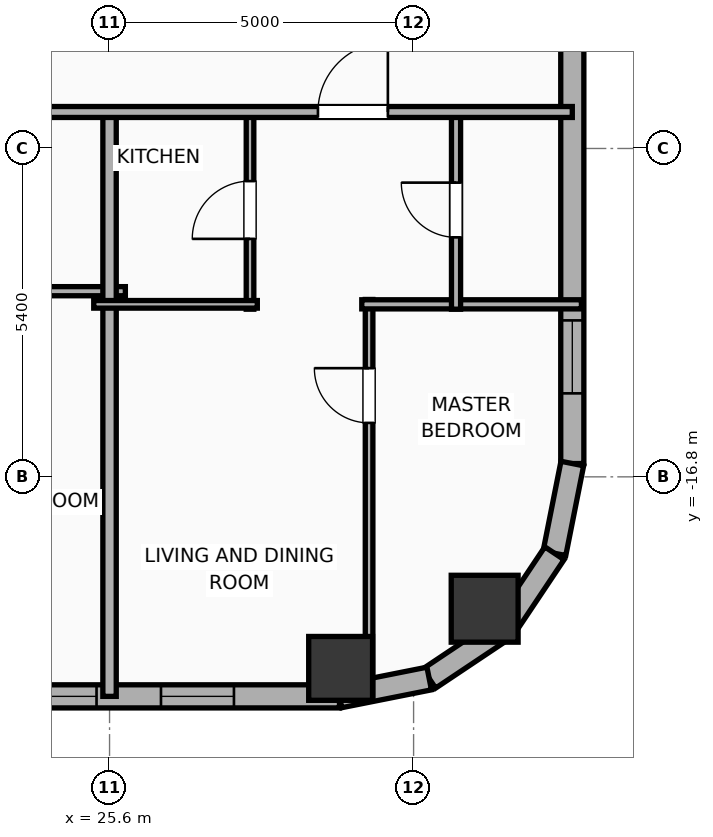
"""IFC4 building model, lengths in metres.
Left out: names, types, materials, properties, quantities, classifications, styles, units other than length and angle.
Written with IfcOpenShell. Run it as: python <this file> out.ifc"""

import sys

from ifc_helpers import new_model, si_unit, direction, frame, frame_2d, origin, origin_2d, place, context, subcontext, project, spatial, rectangle, hollow_rectangle, hollow_circle, extrude, element, fill, save


model = new_model("IFC4")
c1 = context("Model", 3, precision=1e-05, world=origin(), true_north=direction((0.0, 1.0)))
c2 = subcontext(c1, "Body", "Model", "MODEL_VIEW")
j1 = project(units=[si_unit("LENGTHUNIT", "METRE"), si_unit("PLANEANGLEUNIT", "RADIAN")], contexts=[c1])
p1 = place(None, origin())
s1 = spatial("IfcSite", under=j1, at=p1, CompositionType="ELEMENT")
p2 = place(p1, origin())
s2 = spatial("IfcBuilding", under=s1, at=p2, CompositionType="ELEMENT")
p3 = place(p2, frame((0.0, 0.0, 109.2)))
s3 = spatial("IfcBuildingStorey", under=s2, at=p3, CompositionType="ELEMENT", Elevation=109.2)
p4 = place(p3, frame((29.4, -19.95, 0.0), z_axis=(0.0, 0.0, 1.0), x_axis=(1.0, 0.0, 0.0)))
e1 = element("IfcColumn", 1, at=p4, inside=s3, PredefinedType="COLUMN", context=c2, shape_type="SweptSolid", body=[
    extrude(hollow_rectangle(XDim=1.05, YDim=1.05, WallThickness=0.036, at=origin_2d()), origin(), (0.0, 0.0, 1.0), 3.9),
])
p5 = place(p3, frame((31.769, -18.969, 0.0), z_axis=(0.0, 0.0, 1.0), x_axis=(1.0, 0.0, 0.0)))
e2 = element("IfcColumn", 2, at=p5, inside=s3, PredefinedType="COLUMN", context=c2, shape_type="SweptSolid", body=[
    extrude(hollow_circle(Radius=0.55, WallThickness=0.036, at=origin_2d()), origin(), (0.0, 0.0, 1.0), 3.9),
])
p6 = place(p3, frame((29.381, -20.41, 0.0), z_axis=(0.0, 0.0, 1.0), x_axis=(-1.0, 0.0, 0.0)))
e3 = element("IfcWall", 3, at=p6, inside=s3, PredefinedType="ELEMENTEDWALL", context=c2, shape_type="SweptSolid", body=[
    extrude(rectangle(XDim=54.763, YDim=0.38, at=frame_2d((27.381, 0.0))), origin(), (0.0, 0.0, 1.0), 3.65),
])
p7 = place(p6, frame((3.995, 0.0, 0.75)))
e4 = element("IfcOpeningElement", 4, at=p7, cuts=e3, PredefinedType="OPENING", context=c2, shape_type="SweptSolid", body=[
    extrude(rectangle(XDim=2.4, YDim=2.1, at=frame_2d((1.2, 1.05))), frame((0.0, 0.2, 0.0), z_axis=(0.0, -1.0, 0.0), x_axis=(1.0, 0.0, 0.0)), (0.0, 0.0, 1.0), 0.4),
])
p8 = place(p6, frame((18.486, 0.0, 0.75)))
e5 = element("IfcOpeningElement", 5, at=p8, cuts=e3, PredefinedType="OPENING", context=c2, shape_type="SweptSolid", body=[
    extrude(rectangle(XDim=2.4, YDim=2.1, at=frame_2d((1.2, 1.05))), frame((0.0, 0.2, 0.0), z_axis=(0.0, -1.0, 0.0), x_axis=(1.0, 0.0, 0.0)), (0.0, 0.0, 1.0), 0.4),
])
p9 = place(p6, frame((46.717, 0.0, 0.75)))
e6 = element("IfcOpeningElement", 6, at=p9, cuts=e3, PredefinedType="OPENING", context=c2, shape_type="SweptSolid", body=[
    extrude(rectangle(XDim=2.4, YDim=2.1, at=frame_2d((1.2, 1.05))), frame((0.0, 0.2, 0.0), z_axis=(0.0, -1.0, 0.0), x_axis=(1.0, 0.0, 0.0)), (0.0, 0.0, 1.0), 0.4),
])
p10 = place(p6, frame((52.651, 0.0, 0.75)))
e7 = element("IfcOpeningElement", 7, at=p10, cuts=e3, PredefinedType="OPENING", context=c2, shape_type="SweptSolid", body=[
    extrude(rectangle(XDim=1.2, YDim=2.05, at=frame_2d((0.6, 1.025))), frame((0.0, 0.2, 0.0), z_axis=(0.0, -1.0, 0.0), x_axis=(1.0, 0.0, 0.0)), (0.0, 0.0, 1.0), 0.4),
])
p11 = place(p6, frame((50.521, 0.0, 0.75)))
e8 = element("IfcOpeningElement", 8, at=p11, cuts=e3, PredefinedType="OPENING", context=c2, shape_type="SweptSolid", body=[
    extrude(rectangle(XDim=1.2, YDim=2.05, at=frame_2d((0.6, 1.025))), frame((0.0, 0.2, 0.0), z_axis=(0.0, -1.0, 0.0), x_axis=(1.0, 0.0, 0.0)), (0.0, 0.0, 1.0), 0.4),
])
p12 = place(p6, frame((40.191, 0.0, 0.75)))
e9 = element("IfcOpeningElement", 9, at=p12, cuts=e3, PredefinedType="OPENING", context=c2, shape_type="SweptSolid", body=[
    extrude(rectangle(XDim=1.2, YDim=2.05, at=frame_2d((0.6, 1.025))), frame((0.0, 0.2, 0.0), z_axis=(0.0, -1.0, 0.0), x_axis=(1.0, 0.0, 0.0)), (0.0, 0.0, 1.0), 0.4),
])
p13 = place(p6, frame((44.631, 0.0, 0.75)))
e10 = element("IfcOpeningElement", 10, at=p13, cuts=e3, PredefinedType="OPENING", context=c2, shape_type="SweptSolid", body=[
    extrude(rectangle(XDim=1.2, YDim=2.05, at=frame_2d((0.6, 1.025))), frame((0.0, 0.2, 0.0), z_axis=(0.0, -1.0, 0.0), x_axis=(1.0, 0.0, 0.0)), (0.0, 0.0, 1.0), 0.4),
])
p14 = place(p6, frame((36.561, 0.0, 0.75)))
e11 = element("IfcOpeningElement", 11, at=p14, cuts=e3, PredefinedType="OPENING", context=c2, shape_type="SweptSolid", body=[
    extrude(rectangle(XDim=1.2, YDim=2.05, at=frame_2d((0.6, 1.025))), frame((0.0, 0.2, 0.0), z_axis=(0.0, -1.0, 0.0), x_axis=(1.0, 0.0, 0.0)), (0.0, 0.0, 1.0), 0.4),
])
p15 = place(p6, frame((30.004, 0.0, 0.75)))
e12 = element("IfcOpeningElement", 12, at=p15, cuts=e3, PredefinedType="OPENING", context=c2, shape_type="SweptSolid", body=[
    extrude(rectangle(XDim=1.2, YDim=2.05, at=frame_2d((0.6, 1.025))), frame((0.0, 0.2, 0.0), z_axis=(0.0, -1.0, 0.0), x_axis=(1.0, 0.0, 0.0)), (0.0, 0.0, 1.0), 0.4),
])
p16 = place(p6, frame((33.599, 0.0, 0.75)))
e13 = element("IfcOpeningElement", 13, at=p16, cuts=e3, PredefinedType="OPENING", context=c2, shape_type="SweptSolid", body=[
    extrude(rectangle(XDim=1.2, YDim=2.05, at=frame_2d((0.6, 1.025))), frame((0.0, 0.2, 0.0), z_axis=(0.0, -1.0, 0.0), x_axis=(1.0, 0.0, 0.0)), (0.0, 0.0, 1.0), 0.4),
])
p17 = place(p6, frame((26.086, 0.0, 0.75)))
e14 = element("IfcOpeningElement", 14, at=p17, cuts=e3, PredefinedType="OPENING", context=c2, shape_type="SweptSolid", body=[
    extrude(rectangle(XDim=1.2, YDim=2.05, at=frame_2d((0.6, 1.025))), frame((0.0, 0.2, 0.0), z_axis=(0.0, -1.0, 0.0), x_axis=(1.0, 0.0, 0.0)), (0.0, 0.0, 1.0), 0.4),
])
p18 = place(p6, frame((22.626, 0.0, 0.75)))
e15 = element("IfcOpeningElement", 15, at=p18, cuts=e3, PredefinedType="OPENING", context=c2, shape_type="SweptSolid", body=[
    extrude(rectangle(XDim=1.2, YDim=2.05, at=frame_2d((0.6, 1.025))), frame((0.0, 0.2, 0.0), z_axis=(0.0, -1.0, 0.0), x_axis=(1.0, 0.0, 0.0)), (0.0, 0.0, 1.0), 0.4),
])
p19 = place(p6, frame((15.361, 0.0, 0.75)))
e16 = element("IfcOpeningElement", 16, at=p19, cuts=e3, PredefinedType="OPENING", context=c2, shape_type="SweptSolid", body=[
    extrude(rectangle(XDim=1.2, YDim=2.05, at=frame_2d((0.6, 1.025))), frame((0.0, 0.2, 0.0), z_axis=(0.0, -1.0, 0.0), x_axis=(1.0, 0.0, 0.0)), (0.0, 0.0, 1.0), 0.4),
])
p20 = place(p6, frame((8.986, 0.0, 0.75)))
e17 = element("IfcOpeningElement", 17, at=p20, cuts=e3, PredefinedType="OPENING", context=c2, shape_type="SweptSolid", body=[
    extrude(rectangle(XDim=1.2, YDim=2.05, at=frame_2d((0.6, 1.025))), frame((0.0, 0.2, 0.0), z_axis=(0.0, -1.0, 0.0), x_axis=(1.0, 0.0, 0.0)), (0.0, 0.0, 1.0), 0.4),
])
p21 = place(p6, frame((1.736, 0.0, 0.75)))
e18 = element("IfcOpeningElement", 18, at=p21, cuts=e3, PredefinedType="OPENING", context=c2, shape_type="SweptSolid", body=[
    extrude(rectangle(XDim=1.2, YDim=2.05, at=frame_2d((0.6, 1.025))), frame((0.0, 0.2, 0.0), z_axis=(0.0, -1.0, 0.0), x_axis=(1.0, 0.0, 0.0)), (0.0, 0.0, 1.0), 0.4),
])
p22 = place(p3, frame((33.21, 17.781, 0.0), z_axis=(0.0, 0.0, 1.0), x_axis=(0.0, -1.0, 0.0)))
e19 = element("IfcWall", 19, at=p22, inside=s3, PredefinedType="ELEMENTEDWALL", context=c2, shape_type="SweptSolid", body=[
    extrude(rectangle(XDim=34.363, YDim=0.38, at=frame_2d((17.181, 0.0))), origin(), (0.0, 0.0, 1.0), 3.65),
])
p23 = place(p22, frame((32.008, 0.0, 0.75)))
e20 = element("IfcOpeningElement", 20, at=p23, cuts=e19, PredefinedType="OPENING", context=c2, shape_type="SweptSolid", body=[
    extrude(rectangle(XDim=1.2, YDim=2.05, at=frame_2d((0.6, 1.025))), frame((0.0, 0.2, 0.0), z_axis=(0.0, -1.0, 0.0), x_axis=(1.0, 0.0, 0.0)), (0.0, 0.0, 1.0), 0.4),
])
p24 = place(p22, frame((12.486, 0.0, 0.75)))
e21 = element("IfcOpeningElement", 21, at=p24, cuts=e19, PredefinedType="OPENING", context=c2, shape_type="SweptSolid", body=[
    extrude(rectangle(XDim=1.2, YDim=2.05, at=frame_2d((0.6, 1.025))), frame((0.0, 0.2, 0.0), z_axis=(0.0, -1.0, 0.0), x_axis=(1.0, 0.0, 0.0)), (0.0, 0.0, 1.0), 0.4),
])
p25 = place(p22, frame((21.736, 0.0, 0.75)))
e22 = element("IfcOpeningElement", 22, at=p25, cuts=e19, PredefinedType="OPENING", context=c2, shape_type="SweptSolid", body=[
    extrude(rectangle(XDim=1.2, YDim=2.05, at=frame_2d((0.6, 1.025))), frame((0.0, 0.2, 0.0), z_axis=(0.0, -1.0, 0.0), x_axis=(1.0, 0.0, 0.0)), (0.0, 0.0, 1.0), 0.4),
])
p26 = place(p3, frame((33.21, -16.581, 0.0), z_axis=(0.0, 0.0, 1.0), x_axis=(-0.195086038585, -0.980786132421, 0.0)))
e23 = element("IfcWall", 23, at=p26, inside=s3, PredefinedType="ELEMENTEDWALL", context=c2, shape_type="SweptSolid", body=[
    extrude(rectangle(XDim=1.504, YDim=0.38, at=frame_2d((0.752, 0.0))), origin(), (0.0, 0.0, 1.0), 3.65),
])
p27 = place(p3, frame((32.917, -18.057, 0.0), z_axis=(0.0, 0.0, 1.0), x_axis=(-0.555610286119, -0.831442848281, 0.0)))
e24 = element("IfcWall", 24, at=p27, inside=s3, PredefinedType="ELEMENTEDWALL", context=c2, shape_type="SweptSolid", body=[
    extrude(rectangle(XDim=1.485, YDim=0.38, at=frame_2d((0.743, 0.0))), origin(), (0.0, 0.0, 1.0), 3.65),
])
p28 = place(p3, frame((32.091, -19.292, 0.0), z_axis=(0.0, 0.0, 1.0), x_axis=(-0.831468045563, -0.555572577804, 0.0)))
e25 = element("IfcWall", 25, at=p28, inside=s3, PredefinedType="ELEMENTEDWALL", context=c2, shape_type="SweptSolid", body=[
    extrude(rectangle(XDim=1.485, YDim=0.38, at=frame_2d((0.742, 0.0))), origin(), (0.0, 0.0, 1.0), 3.65),
])
p29 = place(p3, frame((30.857, -20.116, 0.0), z_axis=(0.0, 0.0, 1.0), x_axis=(-0.980786132421, -0.195086038585, 0.0)))
e26 = element("IfcWall", 26, at=p29, inside=s3, PredefinedType="ELEMENTEDWALL", context=c2, shape_type="SweptSolid", body=[
    extrude(rectangle(XDim=1.504, YDim=0.38, at=frame_2d((0.752, 0.0))), origin(), (0.0, 0.0, 1.0), 3.65),
])
p30 = place(p3, frame((22.07, -13.747, 0.0), z_axis=(0.0, 0.0, 1.0), x_axis=(1.0, 0.0, 0.0)))
e27 = element("IfcWall", 27, at=p30, inside=s3, PredefinedType="PLUMBINGWALL", context=c2, shape_type="SweptSolid", body=[
    extrude(rectangle(XDim=3.79, YDim=0.15, at=frame_2d((1.895, 0.0))), origin(), (0.0, 0.0, 1.0), 3.65),
])
p31 = place(p3, frame((25.6, -20.41, 0.0), z_axis=(0.0, 0.0, 1.0), x_axis=(0.0, 1.0, 0.0)))
e28 = element("IfcWall", 28, at=p31, inside=s3, PredefinedType="PARTITIONING", context=c2, shape_type="SweptSolid", body=[
    extrude(rectangle(XDim=9.69, YDim=0.22, at=frame_2d((4.845, 0.0))), origin(), (0.0, 0.0, 1.0), 3.65),
])
p32 = place(p3, frame((29.868, -20.466, 0.0), z_axis=(0.0, 0.0, 1.0), x_axis=(0.0, 1.0, 0.0)))
e29 = element("IfcWall", 29, at=p32, inside=s3, PredefinedType="PARTITIONING", context=c2, shape_type="SweptSolid", body=[
    extrude(rectangle(XDim=6.583, YDim=0.125, at=frame_2d((3.292, 0.0))), origin(), (0.0, 0.0, 1.0), 3.65),
])
p33 = place(p32, frame((4.553, 0.0, 0.0)))
e30 = element("IfcOpeningElement", 30, at=p33, cuts=e29, PredefinedType="OPENING", context=c2, shape_type="SweptSolid", body=[
    extrude(rectangle(XDim=0.9, YDim=2.05, at=frame_2d((0.45, 1.025))), frame((0.0, 0.073, 0.0), z_axis=(0.0, -1.0, 0.0), x_axis=(1.0, 0.0, 0.0)), (0.0, 0.0, 1.0), 0.145),
])
p34 = place(p3, frame((29.748, -13.963, 0.0), z_axis=(0.0, 0.0, 1.0), x_axis=(1.0, 0.0, 0.0)))
e31 = element("IfcWall", 31, at=p34, inside=s3, PredefinedType="PLUMBINGWALL", context=c2, shape_type="SweptSolid", body=[
    extrude(rectangle(XDim=3.612, YDim=0.15, at=frame_2d((1.806, 0.0))), origin(), (0.0, 0.0, 1.0), 3.65),
])
p35 = place(p3, frame((27.91, -14.043, 0.0), z_axis=(0.0, 0.0, 1.0), x_axis=(0.0, 1.0, 0.0)))
e32 = element("IfcWall", 32, at=p35, inside=s3, PredefinedType="PARTITIONING", context=c2, shape_type="SweptSolid", body=[
    extrude(rectangle(XDim=3.263, YDim=0.125, at=frame_2d((1.631, 0.0))), origin(), (0.0, 0.0, 1.0), 3.65),
])
p36 = place(p35, frame((1.156, 0.0, 0.0)))
e33 = element("IfcOpeningElement", 33, at=p36, cuts=e32, PredefinedType="OPENING", context=c2, shape_type="SweptSolid", body=[
    extrude(rectangle(XDim=0.95, YDim=2.05, at=frame_2d((0.475, 1.025))), frame((0.0, 0.073, 0.0), z_axis=(0.0, -1.0, 0.0), x_axis=(1.0, 0.0, 0.0)), (0.0, 0.0, 1.0), 0.145),
])
p37 = place(p3, frame((25.34, -13.963, 0.0), z_axis=(0.0, 0.0, 1.0), x_axis=(1.0, 0.0, 0.0)))
e34 = element("IfcWall", 34, at=p37, inside=s3, PredefinedType="PARTITIONING", context=c2, shape_type="SweptSolid", body=[
    extrude(rectangle(XDim=2.69, YDim=0.125, at=frame_2d((1.345, 0.0))), origin(), (0.0, 0.0, 1.0), 3.65),
])
p38 = place(p3, frame((31.298, -14.043, 0.0), z_axis=(0.0, 0.0, 1.0), x_axis=(0.0, 1.0, 0.0)))
e35 = element("IfcWall", 35, at=p38, inside=s3, PredefinedType="PLUMBINGWALL", context=c2, shape_type="SweptSolid", body=[
    extrude(rectangle(XDim=3.263, YDim=0.15, at=frame_2d((1.631, 0.0))), origin(), (0.0, 0.0, 1.0), 3.65),
])
p39 = place(p38, frame((1.181, 0.0, 0.0)))
e36 = element("IfcOpeningElement", 36, at=p39, cuts=e35, PredefinedType="OPENING", context=c2, shape_type="SweptSolid", body=[
    extrude(rectangle(XDim=0.9, YDim=2.05, at=frame_2d((0.45, 1.025))), frame((0.0, 0.085, 0.0), z_axis=(0.0, -1.0, 0.0), x_axis=(1.0, 0.0, 0.0)), (0.0, 0.0, 1.0), 0.17),
])
p40 = place(p3, frame((-29.21, -10.8, 0.0), z_axis=(0.0, 0.0, 1.0), x_axis=(1.0, 0.0, 0.0)))
e37 = element("IfcWall", 37, at=p40, inside=s3, PredefinedType="PARTITIONING", context=c2, shape_type="SweptSolid", body=[
    extrude(rectangle(XDim=62.42, YDim=0.18, at=frame_2d((31.21, 0.0))), origin(), (0.0, 0.0, 1.0), 3.65),
])
p41 = place(p40, frame((2.74, 0.0, 0.0)))
e38 = element("IfcOpeningElement", 38, at=p41, cuts=e37, PredefinedType="OPENING", context=c2, shape_type="SweptSolid", body=[
    extrude(rectangle(XDim=0.9, YDim=2.05, at=frame_2d((0.45, 1.025))), frame((0.0, 0.1, 0.0), z_axis=(0.0, -1.0, 0.0), x_axis=(1.0, 0.0, 0.0)), (0.0, 0.0, 1.0), 0.2),
])
p42 = place(p40, frame((9.968, 0.0, 0.0)))
e39 = element("IfcOpeningElement", 39, at=p42, cuts=e37, PredefinedType="OPENING", context=c2, shape_type="SweptSolid", body=[
    extrude(rectangle(XDim=1.15, YDim=2.05, at=frame_2d((0.575, 1.025))), frame((0.0, 0.1, 0.0), z_axis=(0.0, -1.0, 0.0), x_axis=(1.0, 0.0, 0.0)), (0.0, 0.0, 1.0), 0.2),
])
p43 = place(p40, frame((17.227, 0.0, 0.0)))
e40 = element("IfcOpeningElement", 40, at=p43, cuts=e37, PredefinedType="OPENING", context=c2, shape_type="SweptSolid", body=[
    extrude(rectangle(XDim=1.15, YDim=2.05, at=frame_2d((0.575, 1.025))), frame((0.0, 0.1, 0.0), z_axis=(0.0, -1.0, 0.0), x_axis=(1.0, 0.0, 0.0)), (0.0, 0.0, 1.0), 0.2),
])
p44 = place(p40, frame((28.157, 0.0, 0.0)))
e41 = element("IfcOpeningElement", 41, at=p44, cuts=e37, PredefinedType="OPENING", context=c2, shape_type="SweptSolid", body=[
    extrude(rectangle(XDim=1.15, YDim=2.05, at=frame_2d((0.575, 1.025))), frame((0.0, 0.1, 0.0), z_axis=(0.0, -1.0, 0.0), x_axis=(1.0, 0.0, 0.0)), (0.0, 0.0, 1.0), 0.2),
])
p45 = place(p40, frame((38.512, 0.0, 0.0)))
e42 = element("IfcOpeningElement", 42, at=p45, cuts=e37, PredefinedType="OPENING", context=c2, shape_type="SweptSolid", body=[
    extrude(rectangle(XDim=1.15, YDim=2.05, at=frame_2d((0.575, 1.025))), frame((0.0, 0.1, 0.0), z_axis=(0.0, -1.0, 0.0), x_axis=(1.0, 0.0, 0.0)), (0.0, 0.0, 1.0), 0.2),
])
p46 = place(p40, frame((49.33, 0.0, 0.0)))
e43 = element("IfcOpeningElement", 43, at=p46, cuts=e37, PredefinedType="OPENING", context=c2, shape_type="SweptSolid", body=[
    extrude(rectangle(XDim=1.15, YDim=2.05, at=frame_2d((0.575, 1.025))), frame((0.0, 0.1, 0.0), z_axis=(0.0, -1.0, 0.0), x_axis=(1.0, 0.0, 0.0)), (0.0, 0.0, 1.0), 0.2),
])
p47 = place(p40, frame((58.237, 0.0, 0.0)))
e44 = element("IfcOpeningElement", 44, at=p47, cuts=e37, PredefinedType="OPENING", context=c2, shape_type="SweptSolid", body=[
    extrude(rectangle(XDim=1.15, YDim=2.05, at=frame_2d((0.575, 1.025))), frame((0.0, 0.1, 0.0), z_axis=(0.0, -1.0, 0.0), x_axis=(1.0, 0.0, 0.0)), (0.0, 0.0, 1.0), 0.2),
])
p48 = place(p7, origin())
e45 = element("IfcWindow", 45, at=p48, inside=s3, PartitioningType="SINGLE_PANEL", PredefinedType="WINDOW", context=c2, shape_type="SweptSolid", body=[
    extrude(rectangle(XDim=2.4, YDim=2.1, at=frame_2d((1.2, 1.05))), frame((0.0, 0.03, 0.0), z_axis=(0.0, -1.0, 0.0), x_axis=(1.0, 0.0, 0.0)), (0.0, 0.0, 1.0), 0.06),
])
fill(e4, e45)
p49 = place(p21, origin())
e46 = element("IfcWindow", 46, at=p49, inside=s3, PartitioningType="SINGLE_PANEL", PredefinedType="WINDOW", context=c2, shape_type="SweptSolid", body=[
    extrude(rectangle(XDim=1.2, YDim=2.05, at=frame_2d((0.6, 1.025))), frame((0.0, 0.03, 0.0), z_axis=(0.0, -1.0, 0.0), x_axis=(1.0, 0.0, 0.0)), (0.0, 0.0, 1.0), 0.06),
])
fill(e18, e46)
p50 = place(p23, origin())
e47 = element("IfcWindow", 47, at=p50, inside=s3, PartitioningType="SINGLE_PANEL", PredefinedType="WINDOW", context=c2, shape_type="SweptSolid", body=[
    extrude(rectangle(XDim=1.2, YDim=2.05, at=frame_2d((0.6, 1.025))), frame((0.0, 0.03, 0.0), z_axis=(0.0, -1.0, 0.0), x_axis=(1.0, 0.0, 0.0)), (0.0, 0.0, 1.0), 0.06),
])
fill(e20, e47)
p51 = place(p33, origin())
e48 = element("IfcDoor", 48, at=p51, inside=s3, OperationType="SINGLE_SWING_RIGHT", PredefinedType="DOOR", context=c2, shape_type="SweptSolid", body=[
    extrude(rectangle(XDim=0.9, YDim=2.05, at=frame_2d((0.45, 1.025))), frame((0.0, 0.025, 0.0), z_axis=(0.0, -1.0, 0.0), x_axis=(1.0, 0.0, 0.0)), (0.0, 0.0, 1.0), 0.05),
])
fill(e30, e48)
p52 = place(p36, origin())
e49 = element("IfcDoor", 49, at=p52, inside=s3, OperationType="SINGLE_SWING_LEFT", PredefinedType="DOOR", context=c2, shape_type="SweptSolid", body=[
    extrude(rectangle(XDim=0.95, YDim=2.05, at=frame_2d((0.475, 1.025))), frame((0.0, 0.025, 0.0), z_axis=(0.0, -1.0, 0.0), x_axis=(1.0, 0.0, 0.0)), (0.0, 0.0, 1.0), 0.05),
])
fill(e33, e49)
p53 = place(p39, origin())
e50 = element("IfcDoor", 50, at=p53, inside=s3, OperationType="SINGLE_SWING_RIGHT", PredefinedType="DOOR", context=c2, shape_type="SweptSolid", body=[
    extrude(rectangle(XDim=0.9, YDim=2.05, at=frame_2d((0.45, 1.025))), frame((0.0, 0.025, 0.0), z_axis=(0.0, -1.0, 0.0), x_axis=(1.0, 0.0, 0.0)), (0.0, 0.0, 1.0), 0.05),
])
fill(e36, e50)
p54 = place(p47, origin())
e51 = element("IfcDoor", 51, at=p54, inside=s3, OperationType="SINGLE_SWING_RIGHT", PredefinedType="DOOR", context=c2, shape_type="SweptSolid", body=[
    extrude(rectangle(XDim=1.15, YDim=2.05, at=frame_2d((0.575, 1.025))), frame((0.0, 0.025, 0.0), z_axis=(0.0, -1.0, 0.0), x_axis=(1.0, 0.0, 0.0)), (0.0, 0.0, 1.0), 0.05),
])
fill(e44, e51)
save(model, sys.argv[1])
